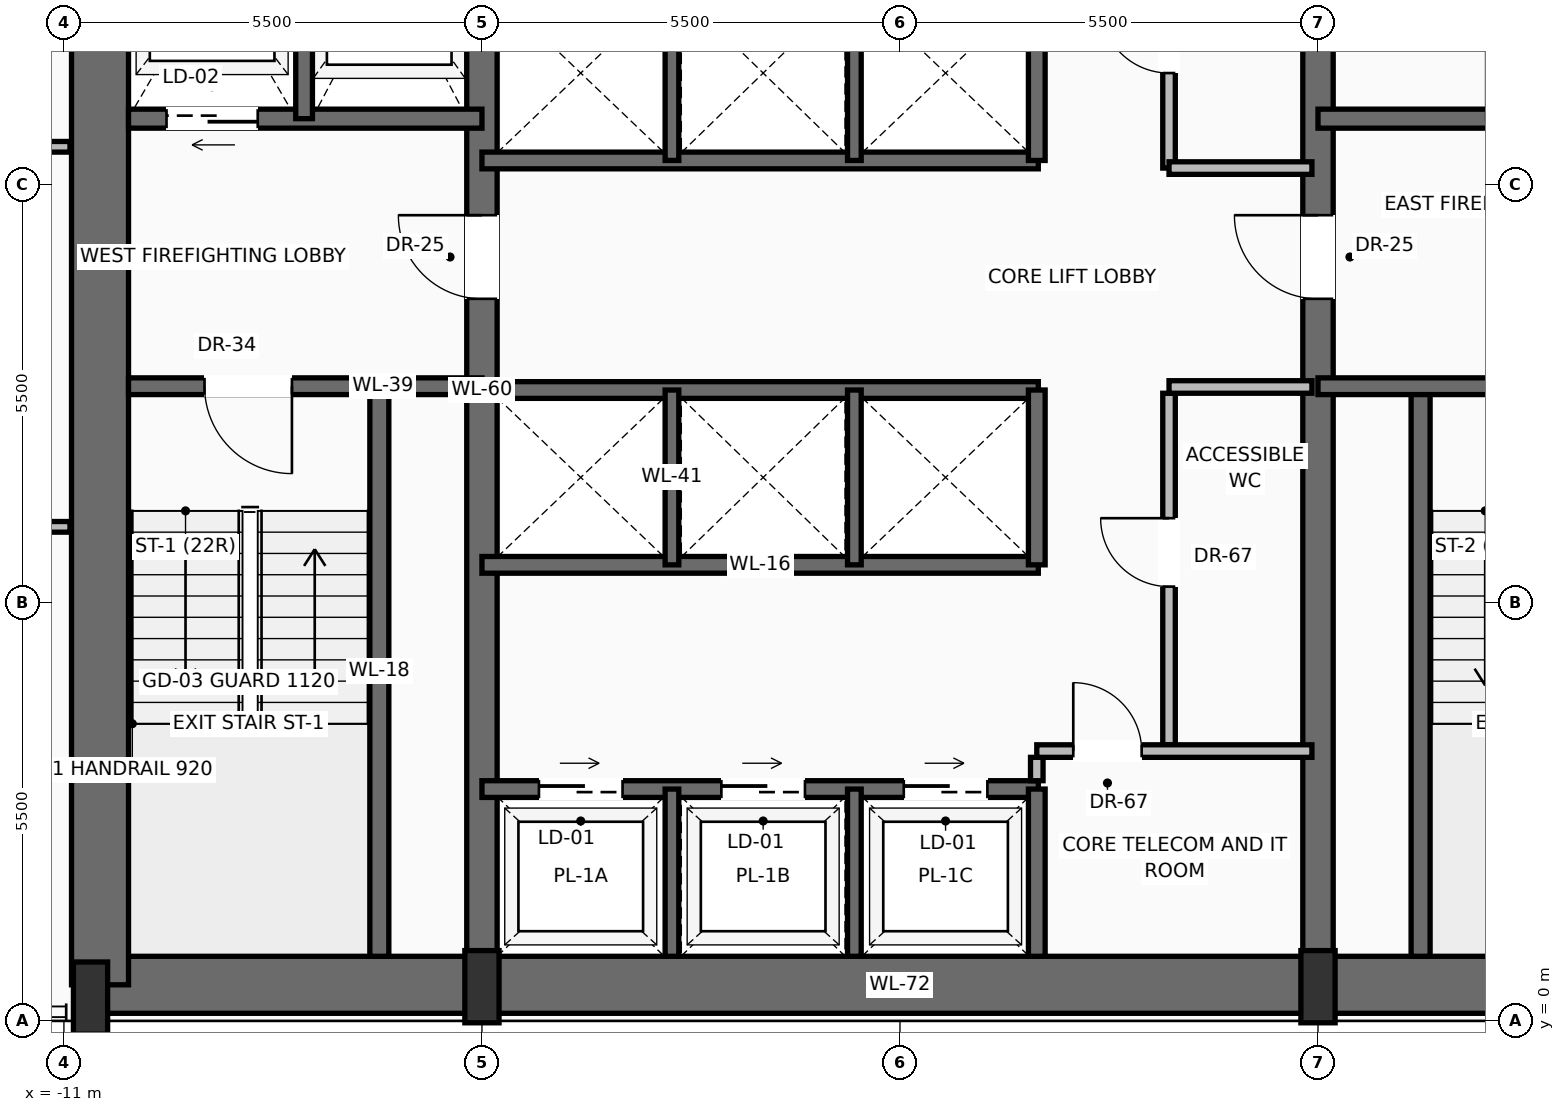
"""IFC4 building model, lengths in metres.
Left out: names, types, materials, properties, quantities, classifications, styles, units other than length and angle.
Written with IfcOpenShell. Run it as: python <this file> out.ifc"""

import sys

from ifc_helpers import new_model, si_unit, direction, frame, frame_2d, origin, origin_2d, place, context, subcontext, project, spatial, rectangle, extrude, source, transform, mapped, element, fill, save


model = new_model("IFC4")
c1 = context("Model", 3, precision=1e-05, world=origin(), true_north=direction((0.0, 1.0)))
c2 = subcontext(c1, "Body", "Model", "MODEL_VIEW")
j1 = project(units=[si_unit("LENGTHUNIT", "METRE"), si_unit("PLANEANGLEUNIT", "RADIAN")], contexts=[c1])
p1 = place(None, origin())
s1 = spatial("IfcSite", under=j1, at=p1, CompositionType="ELEMENT")
p2 = place(p1, origin())
s2 = spatial("IfcBuilding", under=s1, at=p2, CompositionType="ELEMENT")
p3 = place(p2, frame((0.0, 0.0, 76.6)))
s3 = spatial("IfcBuildingStorey", under=s2, at=p3, CompositionType="ELEMENT", Elevation=76.6)
p4 = place(p3, frame((-10.65, 0.475, 0.0), z_axis=(0.0, 0.0, 1.0), x_axis=(1.0, 0.0, 0.0)))
e1 = element("IfcWall", 1, at=p4, inside=s3, PredefinedType="SHEAR", context=c2, shape_type="SweptSolid", body=[
    extrude(rectangle(XDim=21.3, YDim=0.75, at=frame_2d((10.65, 0.0))), origin(), (0.0, 0.0, 1.0), 3.45),
])
p5 = place(p3, frame((-10.525, 0.475, 0.0), z_axis=(0.0, 0.0, 1.0), x_axis=(0.0, 1.0, 0.0)))
e2 = element("IfcWall", 2, at=p5, inside=s3, PredefinedType="SHEAR", context=c2, shape_type="SweptSolid", body=[
    extrude(rectangle(XDim=15.65, YDim=0.75, at=frame_2d((7.825, 0.0))), origin(), (0.0, 0.0, 1.0), 3.45),
])
p6 = place(p3, frame((-5.5, 0.475, 0.0), z_axis=(0.0, 0.0, 1.0), x_axis=(0.0, 1.0, 0.0)))
e3 = element("IfcWall", 3, at=p6, inside=s3, PredefinedType="SHEAR", context=c2, shape_type="SweptSolid", body=[
    extrude(rectangle(XDim=15.65, YDim=0.4, at=frame_2d((7.825, 0.0))), origin(), (0.0, 0.0, 1.0), 3.45),
])
p7 = place(p6, frame((9.025, 0.0, 0.0)))
e4 = element("IfcOpeningElement", 4, at=p7, cuts=e3, PredefinedType="OPENING", context=c2, shape_type="SweptSolid", body=[
    extrude(rectangle(XDim=1.1, YDim=2.2, at=frame_2d((0.55, 1.1))), frame((0.0, 0.21, 0.0), z_axis=(0.0, -1.0, 0.0), x_axis=(1.0, 0.0, 0.0)), (0.0, 0.0, 1.0), 0.42),
])
p8 = place(p3, frame((5.5, 0.475, 0.0), z_axis=(0.0, 0.0, 1.0), x_axis=(0.0, 1.0, 0.0)))
e5 = element("IfcWall", 5, at=p8, inside=s3, PredefinedType="SHEAR", context=c2, shape_type="SweptSolid", body=[
    extrude(rectangle(XDim=15.65, YDim=0.4, at=frame_2d((7.825, 0.0))), origin(), (0.0, 0.0, 1.0), 3.45),
])
p9 = place(p8, frame((9.025, 0.0, 0.0)))
e6 = element("IfcOpeningElement", 6, at=p9, cuts=e5, PredefinedType="OPENING", context=c2, shape_type="SweptSolid", body=[
    extrude(rectangle(XDim=1.1, YDim=2.2, at=frame_2d((0.55, 1.1))), frame((0.0, 0.21, 0.0), z_axis=(0.0, -1.0, 0.0), x_axis=(1.0, 0.0, 0.0)), (0.0, 0.0, 1.0), 0.42),
])
m1 = source(origin(), c2, "Body", "SweptSolid", [
    extrude(rectangle(XDim=0.45, YDim=0.95, at=origin_2d()), origin(), (0.0, 0.0, 1.0), 3.7),
])
for number, where, z_axis, x_axis in (
    (7, (-10.65, 0.3, 0.0), (0.0, 0.0, 1.0), (1.0, 0.0, 0.0)),
    (8, (-5.5, 0.45, 0.0), (0.0, 0.0, 1.0), (1.0, 0.0, 0.0)),
    (9, (5.5, 0.45, 0.0), (0.0, 0.0, 1.0), (1.0, 0.0, 0.0)),
):
    element("IfcColumn", number, at=place(p3, frame(where, z_axis=z_axis, x_axis=x_axis)), inside=s3, PredefinedType="PILASTER", context=c2, shape_type="MappedRepresentation", body=[
        mapped(m1, transform((0.0, 0.0, 0.0), scale=1.0)),
    ])
p10 = place(p3, frame((-6.85, 0.85, 0.0), z_axis=(0.0, 0.0, 1.0), x_axis=(0.0, 1.0, 0.0)))
e10 = element("IfcWall", 10, at=p10, inside=s3, PredefinedType="SOLIDWALL", context=c2, shape_type="SweptSolid", body=[
    extrude(rectangle(XDim=7.5, YDim=0.25, at=frame_2d((3.75, 0.0))), origin(), (0.0, 0.0, 1.0), 3.45),
])
p11 = place(p3, frame((-5.5, 8.35, 0.0), z_axis=(0.0, 0.0, 1.0), x_axis=(-1.0, 0.0, 0.0)))
e11 = element("IfcWall", 11, at=p11, inside=s3, PredefinedType="SOLIDWALL", context=c2, shape_type="SweptSolid", body=[
    extrude(rectangle(XDim=4.65, YDim=0.22, at=frame_2d((2.325, 0.0))), origin(), (0.0, 0.0, 1.0), 3.45),
])
p12 = place(p11, frame((2.5, 0.0, 0.0)))
e12 = element("IfcOpeningElement", 12, at=p12, cuts=e11, PredefinedType="OPENING", context=c2, shape_type="SweptSolid", body=[
    extrude(rectangle(XDim=1.15, YDim=2.2, at=frame_2d((0.575, 1.1))), frame((0.0, 0.12, 0.0), z_axis=(0.0, -1.0, 0.0), x_axis=(1.0, 0.0, 0.0)), (0.0, 0.0, 1.0), 0.24),
])
p13 = place(p3, frame((-5.5, 11.87, 0.0), z_axis=(0.0, 0.0, 1.0), x_axis=(-1.0, 0.0, 0.0)))
e13 = element("IfcWall", 13, at=p13, inside=s3, PredefinedType="SOLIDWALL", context=c2, shape_type="SweptSolid", body=[
    extrude(rectangle(XDim=4.65, YDim=0.25, at=frame_2d((2.325, 0.0))), origin(), (0.0, 0.0, 1.0), 3.45),
])
p14 = place(p13, frame((2.95, 0.0, 0.0)))
e14 = element("IfcOpeningElement", 14, at=p14, cuts=e13, PredefinedType="OPENING", context=c2, shape_type="SweptSolid", body=[
    extrude(rectangle(XDim=1.2, YDim=2.25, at=frame_2d((0.6, 1.125))), frame((0.0, 0.135, 0.0), z_axis=(0.0, -1.0, 0.0), x_axis=(1.0, 0.0, 0.0)), (0.0, 0.0, 1.0), 0.27),
])
p15 = place(p3, frame((-7.84, 11.87, 0.0), z_axis=(0.0, 0.0, 1.0), x_axis=(0.0, 1.0, 0.0)))
e15 = element("IfcWall", 15, at=p15, inside=s3, PredefinedType="SOLIDWALL", context=c2, shape_type="SweptSolid", body=[
    extrude(rectangle(XDim=3.88, YDim=0.22, at=frame_2d((1.94, 0.0))), origin(), (0.0, 0.0, 1.0), 3.45),
])
p16 = place(p3, frame((6.85, 0.85, 0.0), z_axis=(0.0, 0.0, 1.0), x_axis=(0.0, 1.0, 0.0)))
e16 = element("IfcWall", 16, at=p16, inside=s3, PredefinedType="SOLIDWALL", context=c2, shape_type="SweptSolid", body=[
    extrude(rectangle(XDim=7.5, YDim=0.25, at=frame_2d((3.75, 0.0))), origin(), (0.0, 0.0, 1.0), 3.45),
])
p17 = place(p3, frame((10.15, 8.35, 0.0), z_axis=(0.0, 0.0, 1.0), x_axis=(-1.0, 0.0, 0.0)))
e17 = element("IfcWall", 17, at=p17, inside=s3, PredefinedType="SOLIDWALL", context=c2, shape_type="SweptSolid", body=[
    extrude(rectangle(XDim=4.65, YDim=0.22, at=frame_2d((2.325, 0.0))), origin(), (0.0, 0.0, 1.0), 3.45),
])
p18 = place(p17, frame((1.0, 0.0, 0.0)))
e18 = element("IfcOpeningElement", 18, at=p18, cuts=e17, PredefinedType="OPENING", context=c2, shape_type="SweptSolid", body=[
    extrude(rectangle(XDim=1.15, YDim=2.2, at=frame_2d((0.575, 1.1))), frame((0.0, 0.12, 0.0), z_axis=(0.0, -1.0, 0.0), x_axis=(1.0, 0.0, 0.0)), (0.0, 0.0, 1.0), 0.24),
])
p19 = place(p3, frame((10.15, 11.87, 0.0), z_axis=(0.0, 0.0, 1.0), x_axis=(-1.0, 0.0, 0.0)))
e19 = element("IfcWall", 19, at=p19, inside=s3, PredefinedType="SOLIDWALL", context=c2, shape_type="SweptSolid", body=[
    extrude(rectangle(XDim=4.65, YDim=0.25, at=frame_2d((2.325, 0.0))), origin(), (0.0, 0.0, 1.0), 3.45),
])
p20 = place(p19, frame((0.5, 0.0, 0.0)))
e20 = element("IfcOpeningElement", 20, at=p20, cuts=e19, PredefinedType="OPENING", context=c2, shape_type="SweptSolid", body=[
    extrude(rectangle(XDim=1.2, YDim=2.25, at=frame_2d((0.6, 1.125))), frame((0.0, 0.135, 0.0), z_axis=(0.0, -1.0, 0.0), x_axis=(1.0, 0.0, 0.0)), (0.0, 0.0, 1.0), 0.27),
])
p21 = place(p3, frame((-5.5, 3.05, 0.0), z_axis=(0.0, 0.0, 1.0), x_axis=(1.0, 0.0, 0.0)))
e21 = element("IfcWall", 21, at=p21, inside=s3, PredefinedType="SOLIDWALL", context=c2, shape_type="SweptSolid", body=[
    extrude(rectangle(XDim=7.32, YDim=0.22, at=frame_2d((3.66, 0.0))), origin(), (0.0, 0.0, 1.0), 3.45),
])
p22 = place(p21, frame((0.75, 0.0, 0.0)))
e22 = element("IfcOpeningElement", 22, at=p22, cuts=e21, PredefinedType="OPENING", context=c2, shape_type="SweptSolid", body=[
    extrude(rectangle(XDim=1.1, YDim=2.2, at=frame_2d((0.55, 1.1))), frame((0.0, 0.12, 0.0), z_axis=(0.0, -1.0, 0.0), x_axis=(1.0, 0.0, 0.0)), (0.0, 0.0, 1.0), 0.24),
])
p23 = place(p21, frame((3.15, 0.0, 0.0)))
e23 = element("IfcOpeningElement", 23, at=p23, cuts=e21, PredefinedType="OPENING", context=c2, shape_type="SweptSolid", body=[
    extrude(rectangle(XDim=1.1, YDim=2.2, at=frame_2d((0.55, 1.1))), frame((0.0, 0.12, 0.0), z_axis=(0.0, -1.0, 0.0), x_axis=(1.0, 0.0, 0.0)), (0.0, 0.0, 1.0), 0.24),
])
p24 = place(p21, frame((5.55, 0.0, 0.0)))
e24 = element("IfcOpeningElement", 24, at=p24, cuts=e21, PredefinedType="OPENING", context=c2, shape_type="SweptSolid", body=[
    extrude(rectangle(XDim=1.1, YDim=2.2, at=frame_2d((0.55, 1.1))), frame((0.0, 0.12, 0.0), z_axis=(0.0, -1.0, 0.0), x_axis=(1.0, 0.0, 0.0)), (0.0, 0.0, 1.0), 0.24),
])
p25 = place(p3, frame((1.8, 0.85, 0.0), z_axis=(0.0, 0.0, 1.0), x_axis=(0.0, 1.0, 0.0)))
e25 = element("IfcWall", 25, at=p25, inside=s3, PredefinedType="SOLIDWALL", context=c2, shape_type="SweptSolid", body=[
    extrude(rectangle(XDim=2.2, YDim=0.22, at=frame_2d((1.1, 0.0))), origin(), (0.0, 0.0, 1.0), 3.45),
])
for number, where, z_axis, x_axis in (
    (26, (-3.0, 0.85, 0.0), (0.0, 0.0, 1.0), (0.0, 1.0, 0.0)),
    (27, (-0.6, 0.85, 0.0), (0.0, 0.0, 1.0), (0.0, 1.0, 0.0)),
):
    element("IfcWall", number, at=place(p3, frame(where, z_axis=z_axis, x_axis=x_axis)), inside=s3, PredefinedType="SOLIDWALL", context=c2, shape_type="SweptSolid", body=[
        extrude(rectangle(XDim=2.2, YDim=0.18, at=frame_2d((1.1, 0.0))), origin(), (0.0, 0.0, 1.0), 3.45),
    ])
p26 = place(p3, frame((1.8, 3.16, 0.0), z_axis=(0.0, 0.0, 1.0), x_axis=(0.0, 1.0, 0.0)))
e28 = element("IfcWall", 28, at=p26, inside=s3, PredefinedType="PARTITIONING", context=c2, shape_type="SweptSolid", body=[
    extrude(rectangle(XDim=0.308, YDim=0.165, at=frame_2d((0.154, 0.0))), origin(), (0.0, 0.0, 1.0), 3.442),
])
p27 = place(p3, frame((3.54, 3.633, 0.0), z_axis=(0.0, 0.0, 1.0), x_axis=(0.0, 1.0, 0.0)))
e29 = element("IfcWall", 29, at=p27, inside=s3, PredefinedType="PARTITIONING", context=c2, shape_type="SweptSolid", body=[
    extrude(rectangle(XDim=4.625, YDim=0.165, at=frame_2d((2.312, 0.0))), origin(), (0.0, 0.0, 1.0), 3.442),
])
p28 = place(p27, frame((2.081, 0.0, 0.0)))
e30 = element("IfcOpeningElement", 30, at=p28, cuts=e29, PredefinedType="OPENING", context=c2, shape_type="SweptSolid", body=[
    extrude(rectangle(XDim=0.9, YDim=2.1, at=frame_2d((0.45, 1.05))), frame((0.0, 0.093, 0.0), z_axis=(0.0, -1.0, 0.0), x_axis=(1.0, 0.0, 0.0)), (0.0, 0.0, 1.0), 0.185),
])
p29 = place(p3, frame((3.54, 8.34, 0.0), z_axis=(0.0, 0.0, 1.0), x_axis=(1.0, 0.0, 0.0)))
e31 = element("IfcWall", 31, at=p29, inside=s3, PredefinedType="PARTITIONING", context=c2, shape_type="SweptSolid", body=[
    extrude(rectangle(XDim=1.88, YDim=0.165, at=frame_2d((0.94, 0.0))), origin(), (0.0, 0.0, 1.0), 3.442),
])
p30 = place(p3, frame((1.8, 3.55, 0.0), z_axis=(0.0, 0.0, 1.0), x_axis=(1.0, 0.0, 0.0)))
e32 = element("IfcWall", 32, at=p30, inside=s3, PredefinedType="PARTITIONING", context=c2, shape_type="SweptSolid", body=[
    extrude(rectangle(XDim=3.62, YDim=0.165, at=frame_2d((1.81, 0.0))), origin(), (0.0, 0.0, 1.0), 3.442),
])
p31 = place(p30, frame((0.48, 0.0, 0.0)))
e33 = element("IfcOpeningElement", 33, at=p31, cuts=e32, PredefinedType="OPENING", context=c2, shape_type="SweptSolid", body=[
    extrude(rectangle(XDim=0.9, YDim=2.1, at=frame_2d((0.45, 1.05))), frame((0.0, 0.093, 0.0), z_axis=(0.0, -1.0, 0.0), x_axis=(1.0, 0.0, 0.0)), (0.0, 0.0, 1.0), 0.185),
])
for number, where, z_axis, x_axis in (
    (34, (-5.5, 6.0, 0.0), (0.0, 0.0, 1.0), (1.0, 0.0, 0.0)),
    (35, (-5.5, 8.3, 0.0), (0.0, 0.0, 1.0), (1.0, 0.0, 0.0)),
):
    element("IfcWall", number, at=place(p3, frame(where, z_axis=z_axis, x_axis=x_axis)), inside=s3, PredefinedType="SOLIDWALL", context=c2, shape_type="SweptSolid", body=[
        extrude(rectangle(XDim=7.32, YDim=0.22, at=frame_2d((3.66, 0.0))), origin(), (0.0, 0.0, 1.0), 3.45),
    ])
p32 = place(p3, frame((1.8, 6.0, 0.0), z_axis=(0.0, 0.0, 1.0), x_axis=(0.0, 1.0, 0.0)))
e36 = element("IfcWall", 36, at=p32, inside=s3, PredefinedType="SOLIDWALL", context=c2, shape_type="SweptSolid", body=[
    extrude(rectangle(XDim=2.3, YDim=0.22, at=frame_2d((1.15, 0.0))), origin(), (0.0, 0.0, 1.0), 3.45),
])
for number, where, z_axis, x_axis in (
    (37, (-3.0, 6.0, 0.0), (0.0, 0.0, 1.0), (0.0, 1.0, 0.0)),
    (38, (-0.6, 6.0, 0.0), (0.0, 0.0, 1.0), (0.0, 1.0, 0.0)),
):
    element("IfcWall", number, at=place(p3, frame(where, z_axis=z_axis, x_axis=x_axis)), inside=s3, PredefinedType="SOLIDWALL", context=c2, shape_type="SweptSolid", body=[
        extrude(rectangle(XDim=2.3, YDim=0.18, at=frame_2d((1.15, 0.0))), origin(), (0.0, 0.0, 1.0), 3.45),
    ])
p33 = place(p3, frame((-5.5, 11.32, 0.0), z_axis=(0.0, 0.0, 1.0), x_axis=(1.0, 0.0, 0.0)))
e39 = element("IfcWall", 39, at=p33, inside=s3, PredefinedType="SOLIDWALL", context=c2, shape_type="SweptSolid", body=[
    extrude(rectangle(XDim=7.32, YDim=0.22, at=frame_2d((3.66, 0.0))), origin(), (0.0, 0.0, 1.0), 3.45),
])
p34 = place(p3, frame((1.8, 11.32, 0.0), z_axis=(0.0, 0.0, 1.0), x_axis=(0.0, 1.0, 0.0)))
e40 = element("IfcWall", 40, at=p34, inside=s3, PredefinedType="SOLIDWALL", context=c2, shape_type="SweptSolid", body=[
    extrude(rectangle(XDim=2.3, YDim=0.22, at=frame_2d((1.15, 0.0))), origin(), (0.0, 0.0, 1.0), 3.45),
])
for number, where, z_axis, x_axis in (
    (41, (-3.0, 11.32, 0.0), (0.0, 0.0, 1.0), (0.0, 1.0, 0.0)),
    (42, (-0.6, 11.32, 0.0), (0.0, 0.0, 1.0), (0.0, 1.0, 0.0)),
):
    element("IfcWall", number, at=place(p3, frame(where, z_axis=z_axis, x_axis=x_axis)), inside=s3, PredefinedType="SOLIDWALL", context=c2, shape_type="SweptSolid", body=[
        extrude(rectangle(XDim=2.3, YDim=0.18, at=frame_2d((1.15, 0.0))), origin(), (0.0, 0.0, 1.0), 3.45),
    ])
p35 = place(p3, frame((3.54, 11.22, 0.0), z_axis=(0.0, 0.0, 1.0), x_axis=(0.0, 1.0, 0.0)))
e43 = element("IfcWall", 43, at=p35, inside=s3, PredefinedType="PARTITIONING", context=c2, shape_type="SweptSolid", body=[
    extrude(rectangle(XDim=4.53, YDim=0.165, at=frame_2d((2.265, 0.0))), origin(), (0.0, 0.0, 1.0), 3.442),
])
p36 = place(p35, frame((1.25, 0.0, 0.0)))
e44 = element("IfcOpeningElement", 44, at=p36, cuts=e43, PredefinedType="OPENING", context=c2, shape_type="SweptSolid", body=[
    extrude(rectangle(XDim=0.9, YDim=2.1, at=frame_2d((0.45, 1.05))), frame((0.0, 0.093, 0.0), z_axis=(0.0, -1.0, 0.0), x_axis=(1.0, 0.0, 0.0)), (0.0, 0.0, 1.0), 0.185),
])
p37 = place(p3, frame((3.54, 11.22, 0.0), z_axis=(0.0, 0.0, 1.0), x_axis=(1.0, 0.0, 0.0)))
e45 = element("IfcWall", 45, at=p37, inside=s3, PredefinedType="PARTITIONING", context=c2, shape_type="SweptSolid", body=[
    extrude(rectangle(XDim=1.88, YDim=0.165, at=frame_2d((0.94, 0.0))), origin(), (0.0, 0.0, 1.0), 3.442),
])
p38 = place(p3, frame((-26.178, 6.5, 0.0), z_axis=(0.0, 0.0, 1.0), x_axis=(1.0, 0.0, 0.0)))
e46 = element("IfcWall", 46, at=p38, inside=s3, PredefinedType="PARTITIONING", context=c2, shape_type="SweptSolid", body=[
    extrude(rectangle(XDim=15.258, YDim=0.14, at=frame_2d((7.629, 0.0))), origin(), (0.0, 0.0, 1.0), 3.442),
])
p39 = place(p38, frame((7.164, 0.0, 0.0)))
e47 = element("IfcOpeningElement", 47, at=p39, cuts=e46, PredefinedType="OPENING", context=c2, shape_type="SweptSolid", body=[
    extrude(rectangle(XDim=0.95, YDim=2.2, at=frame_2d((0.475, 1.1))), frame((0.0, 0.08, 0.0), z_axis=(0.0, -1.0, 0.0), x_axis=(1.0, 0.0, 0.0)), (0.0, 0.0, 1.0), 0.16),
])
p40 = place(p3, frame((-26.881, 11.5, 0.0), z_axis=(0.0, 0.0, 1.0), x_axis=(1.0, 0.0, 0.0)))
e48 = element("IfcWall", 48, at=p40, inside=s3, PredefinedType="PARTITIONING", context=c2, shape_type="SweptSolid", body=[
    extrude(rectangle(XDim=15.961, YDim=0.14, at=frame_2d((7.981, 0.0))), origin(), (0.0, 0.0, 1.0), 3.442),
])
p41 = place(p40, frame((7.518, 0.0, 0.0)))
e49 = element("IfcOpeningElement", 49, at=p41, cuts=e48, PredefinedType="OPENING", context=c2, shape_type="SweptSolid", body=[
    extrude(rectangle(XDim=0.95, YDim=2.2, at=frame_2d((0.475, 1.1))), frame((0.0, 0.08, 0.0), z_axis=(0.0, -1.0, 0.0), x_axis=(1.0, 0.0, 0.0)), (0.0, 0.0, 1.0), 0.16),
])
m2 = source(origin(), c2, "Body", "SweptSolid", [
    extrude(rectangle(XDim=1.15, YDim=2.2, at=frame_2d((0.575, 1.1))), frame((0.0, 0.025, 0.0), z_axis=(0.0, -1.0, 0.0), x_axis=(1.0, 0.0, 0.0)), (0.0, 0.0, 1.0), 0.05),
])
p42 = place(p12, origin())
e50 = element("IfcDoor", 50, at=p42, inside=s3, OperationType="SINGLE_SWING_LEFT", PredefinedType="DOOR", context=c2, shape_type="MappedRepresentation", body=[
    mapped(m2, transform((0.0, 0.0, 0.0), scale=1.0)),
])
fill(e12, e50)
m3 = source(origin(), c2, "Body", "SweptSolid", [
    extrude(rectangle(XDim=1.1, YDim=2.2, at=frame_2d((0.55, 1.1))), frame((0.0, 0.025, 0.0), z_axis=(0.0, -1.0, 0.0), x_axis=(1.0, 0.0, 0.0)), (0.0, 0.0, 1.0), 0.05),
])
p43 = place(p7, origin())
e51 = element("IfcDoor", 51, at=p43, inside=s3, OperationType="SINGLE_SWING_RIGHT", PredefinedType="DOOR", context=c2, shape_type="MappedRepresentation", body=[
    mapped(m3, transform((0.0, 0.0, 0.0), scale=1.0)),
])
fill(e4, e51)
m4 = source(origin(), c2, "Body", "SweptSolid", [
    extrude(rectangle(XDim=1.2, YDim=2.25, at=frame_2d((0.6, 1.125))), frame((0.0, 0.025, 0.0), z_axis=(0.0, -1.0, 0.0), x_axis=(1.0, 0.0, 0.0)), (0.0, 0.0, 1.0), 0.05),
])
p44 = place(p14, origin())
e52 = element("IfcDoor", 52, at=p44, inside=s3, OperationType="SLIDING_TO_LEFT", PredefinedType="DOOR", context=c2, shape_type="MappedRepresentation", body=[
    mapped(m4, transform((0.0, 0.0, 0.0), scale=1.0)),
])
fill(e14, e52)
p45 = place(p9, origin())
e53 = element("IfcDoor", 53, at=p45, inside=s3, OperationType="SINGLE_SWING_RIGHT", PredefinedType="DOOR", context=c2, shape_type="MappedRepresentation", body=[
    mapped(m3, transform((0.0, 0.0, 0.0), scale=1.0)),
])
fill(e6, e53)
m5 = source(origin(), c2, "Body", "SweptSolid", [
    extrude(rectangle(XDim=1.1, YDim=2.2, at=frame_2d((0.55, 1.1))), frame((0.0, 0.025, 0.0), z_axis=(0.0, -1.0, 0.0), x_axis=(1.0, 0.0, 0.0)), (0.0, 0.0, 1.0), 0.05),
])
p46 = place(p22, origin())
e54 = element("IfcDoor", 54, at=p46, inside=s3, OperationType="SLIDING_TO_RIGHT", PredefinedType="DOOR", context=c2, shape_type="MappedRepresentation", body=[
    mapped(m5, transform((0.0, 0.0, 0.0), scale=1.0)),
])
fill(e22, e54)
p47 = place(p23, origin())
e55 = element("IfcDoor", 55, at=p47, inside=s3, OperationType="SLIDING_TO_RIGHT", PredefinedType="DOOR", context=c2, shape_type="MappedRepresentation", body=[
    mapped(m5, transform((0.0, 0.0, 0.0), scale=1.0)),
])
fill(e23, e55)
p48 = place(p24, origin())
e56 = element("IfcDoor", 56, at=p48, inside=s3, OperationType="SLIDING_TO_RIGHT", PredefinedType="DOOR", context=c2, shape_type="MappedRepresentation", body=[
    mapped(m5, transform((0.0, 0.0, 0.0), scale=1.0)),
])
fill(e24, e56)
m6 = source(origin(), c2, "Body", "SweptSolid", [
    extrude(rectangle(XDim=0.9, YDim=2.1, at=frame_2d((0.45, 1.05))), frame((0.0, 0.025, 0.0), z_axis=(0.0, -1.0, 0.0), x_axis=(1.0, 0.0, 0.0)), (0.0, 0.0, 1.0), 0.05),
])
p49 = place(p31, origin())
e57 = element("IfcDoor", 57, at=p49, inside=s3, OperationType="SINGLE_SWING_LEFT", PredefinedType="DOOR", context=c2, shape_type="MappedRepresentation", body=[
    mapped(m6, transform((0.0, 0.0, 0.0), scale=1.0)),
])
fill(e33, e57)
p50 = place(p28, origin())
e58 = element("IfcDoor", 58, at=p50, inside=s3, OperationType="SINGLE_SWING_RIGHT", PredefinedType="DOOR", context=c2, shape_type="MappedRepresentation", body=[
    mapped(m6, transform((0.0, 0.0, 0.0), scale=1.0)),
])
fill(e30, e58)
p51 = place(p36, origin())
e59 = element("IfcDoor", 59, at=p51, inside=s3, OperationType="SINGLE_SWING_RIGHT", PredefinedType="DOOR", context=c2, shape_type="MappedRepresentation", body=[
    mapped(m6, transform((0.0, 0.0, 0.0), scale=1.0)),
])
fill(e44, e59)
save(model, sys.argv[1])
